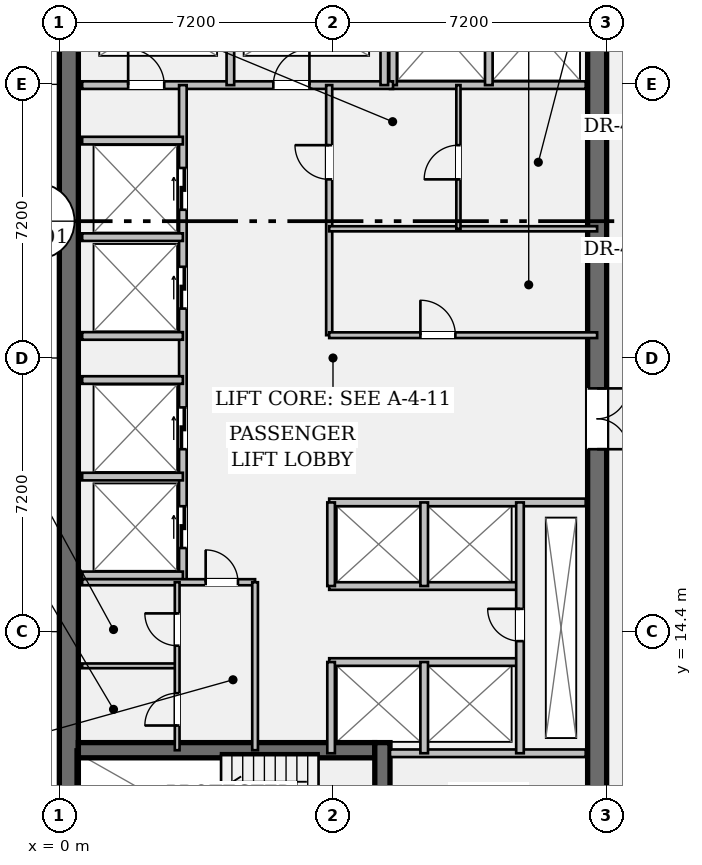
"""IFC4 building model, lengths in metres.
Left out: names, types, materials, properties, quantities, classifications, styles, units other than length and angle.
Written with IfcOpenShell. Run it as: python <this file> out.ifc"""

import sys

from ifc_helpers import new_model, si_unit, direction, frame, frame_2d, origin, place, context, subcontext, project, spatial, rectangle, extrude, element, fill, save


model = new_model("IFC4")
c1 = context("Model", 3, precision=1e-05, world=origin(), true_north=direction((0.0, 1.0)))
c2 = subcontext(c1, "Body", "Model", "MODEL_VIEW")
j1 = project(units=[si_unit("LENGTHUNIT", "METRE"), si_unit("PLANEANGLEUNIT", "RADIAN")], contexts=[c1])
p1 = place(None, origin())
s1 = spatial("IfcSite", under=j1, at=p1, CompositionType="ELEMENT")
p2 = place(p1, origin())
s2 = spatial("IfcBuilding", under=s1, at=p2, CompositionType="ELEMENT")
p3 = place(p2, frame((0.0, 0.0, 173.25)))
s3 = spatial("IfcBuildingStorey", under=s2, at=p3, CompositionType="ELEMENT", Elevation=173.25)
p4 = place(p3, frame((0.25, 7.2, 0.0), z_axis=(0.0, 0.0, 1.0), x_axis=(0.0, 1.0, 0.0)))
e1 = element("IfcWall", 1, at=p4, inside=s3, PredefinedType="SHEAR", context=c2, shape_type="SweptSolid", body=[
    extrude(rectangle(XDim=28.8, YDim=0.5, at=frame_2d((14.4, 0.0))), origin(), (0.0, 0.0, 1.0), 3.24),
])
p5 = place(p3, frame((14.15, 35.5, 0.0), z_axis=(0.0, 0.0, 1.0), x_axis=(0.0, -1.0, 0.0)))
e2 = element("IfcWall", 2, at=p5, inside=s3, PredefinedType="SHEAR", context=c2, shape_type="SweptSolid", body=[
    extrude(rectangle(XDim=27.8, YDim=0.5, at=frame_2d((13.9, 0.0))), origin(), (0.0, 0.0, 1.0), 3.24),
])
p6 = place(p5, frame((1.4, 0.0, 0.0)))
e3 = element("IfcOpeningElement", 3, at=p6, cuts=e2, PredefinedType="OPENING", context=c2, shape_type="SweptSolid", body=[
    extrude(rectangle(XDim=1.2, YDim=2.15, at=frame_2d((0.6, 1.075))), frame((0.0, 0.262, 0.0), z_axis=(0.0, -1.0, 0.0), x_axis=(1.0, 0.0, 0.0)), (0.0, 0.0, 1.0), 0.524),
])
p7 = place(p5, frame((25.35, 0.0, 0.0)))
e4 = element("IfcOpeningElement", 4, at=p7, cuts=e2, PredefinedType="OPENING", context=c2, shape_type="SweptSolid", body=[
    extrude(rectangle(XDim=1.2, YDim=2.15, at=frame_2d((0.6, 1.075))), frame((0.0, 0.262, 0.0), z_axis=(0.0, -1.0, 0.0), x_axis=(1.0, 0.0, 0.0)), (0.0, 0.0, 1.0), 0.524),
])
p8 = place(p5, frame((14.7, 0.0, 0.0)))
e5 = element("IfcOpeningElement", 5, at=p8, cuts=e2, PredefinedType="OPENING", context=c2, shape_type="SweptSolid", body=[
    extrude(rectangle(XDim=1.6, YDim=2.2, at=frame_2d((0.8, 1.1))), frame((0.0, 0.262, 0.0), z_axis=(0.0, -1.0, 0.0), x_axis=(1.0, 0.0, 0.0)), (0.0, 0.0, 1.0), 0.524),
])
p9 = place(p3, frame((0.5, 11.28, 0.0), z_axis=(0.0, 0.0, 1.0), x_axis=(1.0, 0.0, 0.0)))
e6 = element("IfcWall", 6, at=p9, inside=s3, PredefinedType="SHEAR", context=c2, shape_type="SweptSolid", body=[
    extrude(rectangle(XDim=7.8, YDim=0.4, at=frame_2d((3.9, 0.0))), origin(), (0.0, 0.0, 1.0), 3.24),
])
p10 = place(p3, frame((8.5, 7.7, 0.0), z_axis=(0.0, 0.0, 1.0), x_axis=(0.0, 1.0, 0.0)))
e7 = element("IfcWall", 7, at=p10, inside=s3, PredefinedType="SHEAR", context=c2, shape_type="SweptSolid", body=[
    extrude(rectangle(XDim=3.78, YDim=0.4, at=frame_2d((1.89, 0.0))), origin(), (0.0, 0.0, 1.0), 3.24),
])
p11 = place(p10, frame((0.85, 0.0, 0.0)))
e8 = element("IfcOpeningElement", 8, at=p11, cuts=e7, PredefinedType="OPENING", context=c2, shape_type="SweptSolid", body=[
    extrude(rectangle(XDim=1.1, YDim=2.15, at=frame_2d((0.55, 1.075))), frame((0.0, 0.212, 0.0), z_axis=(0.0, -1.0, 0.0), x_axis=(1.0, 0.0, 0.0)), (0.0, 0.0, 1.0), 0.424),
])
for number, where, z_axis, x_axis in (
    (9, (8.7, 11.2, 0.0), (0.0, 0.0, 1.0), (1.0, 0.0, 0.0)),
    (10, (8.7, 28.78, 0.0), (0.0, 0.0, 1.0), (1.0, 0.0, 0.0)),
):
    element("IfcWall", number, at=place(p3, frame(where, z_axis=z_axis, x_axis=x_axis)), inside=s3, PredefinedType="PARTITIONING", context=c2, shape_type="SweptSolid", body=[
        extrude(rectangle(XDim=5.15, YDim=0.2, at=frame_2d((2.575, 0.0))), origin(), (0.0, 0.0, 1.0), 3.24),
    ])
for number, where, z_axis, x_axis in (
    (11, (8.78, 28.78, 0.0), (0.0, 0.0, 1.0), (0.0, 1.0, 0.0)),
    (12, (11.3, 28.78, 0.0), (0.0, 0.0, 1.0), (0.0, 1.0, 0.0)),
):
    element("IfcWall", number, at=place(p3, frame(where, z_axis=z_axis, x_axis=x_axis)), inside=s3, PredefinedType="PARTITIONING", context=c2, shape_type="SweptSolid", body=[
        extrude(rectangle(XDim=3.1, YDim=0.2, at=frame_2d((1.55, 0.0))), origin(), (0.0, 0.0, 1.0), 3.24),
    ])
p12 = place(p3, frame((0.6, 28.78, 0.0), z_axis=(0.0, 0.0, 1.0), x_axis=(1.0, 0.0, 0.0)))
e13 = element("IfcWall", 13, at=p12, inside=s3, PredefinedType="PARTITIONING", context=c2, shape_type="SweptSolid", body=[
    extrude(rectangle(XDim=8.18, YDim=0.2, at=frame_2d((4.09, 0.0))), origin(), (0.0, 0.0, 1.0), 3.24),
])
p13 = place(p12, frame((1.21, 0.0, 0.0)))
e14 = element("IfcOpeningElement", 14, at=p13, cuts=e13, PredefinedType="OPENING", context=c2, shape_type="SweptSolid", body=[
    extrude(rectangle(XDim=0.95, YDim=2.15, at=frame_2d((0.475, 1.075))), frame((0.0, 0.112, 0.0), z_axis=(0.0, -1.0, 0.0), x_axis=(1.0, 0.0, 0.0)), (0.0, 0.0, 1.0), 0.224),
])
p14 = place(p12, frame((5.03, 0.0, 0.0)))
e15 = element("IfcOpeningElement", 15, at=p14, cuts=e13, PredefinedType="OPENING", context=c2, shape_type="SweptSolid", body=[
    extrude(rectangle(XDim=0.95, YDim=2.15, at=frame_2d((0.475, 1.075))), frame((0.0, 0.112, 0.0), z_axis=(0.0, -1.0, 0.0), x_axis=(1.0, 0.0, 0.0)), (0.0, 0.0, 1.0), 0.224),
])
for number, where, z_axis, x_axis in (
    (16, (4.5, 28.78, 0.0), (0.0, 0.0, 1.0), (0.0, 1.0, 0.0)),
    (17, (8.55, 28.78, 0.0), (0.0, 0.0, 1.0), (0.0, 1.0, 0.0)),
):
    element("IfcWall", number, at=place(p3, frame(where, z_axis=z_axis, x_axis=x_axis)), inside=s3, PredefinedType="PARTITIONING", context=c2, shape_type="SweptSolid", body=[
        extrude(rectangle(XDim=2.94, YDim=0.2, at=frame_2d((1.47, 0.0))), origin(), (0.0, 0.0, 1.0), 3.24),
    ])
p15 = place(p3, frame((3.25, 15.7, 0.0), z_axis=(0.0, 0.0, 1.0), x_axis=(0.0, 1.0, 0.0)))
e18 = element("IfcWall", 18, at=p15, inside=s3, PredefinedType="PARTITIONING", context=c2, shape_type="SweptSolid", body=[
    extrude(rectangle(XDim=13.08, YDim=0.2, at=frame_2d((6.54, 0.0))), origin(), (0.0, 0.0, 1.0), 3.24),
])
p16 = place(p15, frame((0.9, 0.0, 0.0)))
e19 = element("IfcOpeningElement", 19, at=p16, cuts=e18, PredefinedType="OPENING", context=c2, shape_type="SweptSolid", body=[
    extrude(rectangle(XDim=1.1, YDim=2.2, at=frame_2d((0.55, 1.1))), frame((0.0, 0.112, 0.0), z_axis=(0.0, -1.0, 0.0), x_axis=(1.0, 0.0, 0.0)), (0.0, 0.0, 1.0), 0.224),
])
p17 = place(p15, frame((3.5, 0.0, 0.0)))
e20 = element("IfcOpeningElement", 20, at=p17, cuts=e18, PredefinedType="OPENING", context=c2, shape_type="SweptSolid", body=[
    extrude(rectangle(XDim=1.1, YDim=2.2, at=frame_2d((0.55, 1.1))), frame((0.0, 0.112, 0.0), z_axis=(0.0, -1.0, 0.0), x_axis=(1.0, 0.0, 0.0)), (0.0, 0.0, 1.0), 0.224),
])
p18 = place(p15, frame((7.2, 0.0, 0.0)))
e21 = element("IfcOpeningElement", 21, at=p18, cuts=e18, PredefinedType="OPENING", context=c2, shape_type="SweptSolid", body=[
    extrude(rectangle(XDim=1.1, YDim=2.2, at=frame_2d((0.55, 1.1))), frame((0.0, 0.112, 0.0), z_axis=(0.0, -1.0, 0.0), x_axis=(1.0, 0.0, 0.0)), (0.0, 0.0, 1.0), 0.224),
])
p19 = place(p15, frame((9.8, 0.0, 0.0)))
e22 = element("IfcOpeningElement", 22, at=p19, cuts=e18, PredefinedType="OPENING", context=c2, shape_type="SweptSolid", body=[
    extrude(rectangle(XDim=1.1, YDim=2.2, at=frame_2d((0.55, 1.1))), frame((0.0, 0.112, 0.0), z_axis=(0.0, -1.0, 0.0), x_axis=(1.0, 0.0, 0.0)), (0.0, 0.0, 1.0), 0.224),
])
for number, where, z_axis, x_axis in (
    (23, (0.6, 15.88, 0.0), (0.0, 0.0, 1.0), (1.0, 0.0, 0.0)),
    (24, (0.6, 18.48, 0.0), (0.0, 0.0, 1.0), (1.0, 0.0, 0.0)),
    (25, (0.6, 22.18, 0.0), (0.0, 0.0, 1.0), (1.0, 0.0, 0.0)),
    (26, (0.6, 24.78, 0.0), (0.0, 0.0, 1.0), (1.0, 0.0, 0.0)),
    (27, (0.6, 21.02, 0.0), (0.0, 0.0, 1.0), (1.0, 0.0, 0.0)),
    (28, (0.6, 27.32, 0.0), (0.0, 0.0, 1.0), (1.0, 0.0, 0.0)),
):
    element("IfcWall", number, at=place(p3, frame(where, z_axis=z_axis, x_axis=x_axis)), inside=s3, PredefinedType="PARTITIONING", context=c2, shape_type="SweptSolid", body=[
        extrude(rectangle(XDim=2.65, YDim=0.2, at=frame_2d((1.325, 0.0))), origin(), (0.0, 0.0, 1.0), 3.24),
    ])
p20 = place(p3, frame((7.1, 22.2, 0.0), z_axis=(0.0, 0.0, 1.0), x_axis=(0.0, 1.0, 0.0)))
e29 = element("IfcWall", 29, at=p20, inside=s3, PredefinedType="PARTITIONING", context=c2, shape_type="SweptSolid", body=[
    extrude(rectangle(XDim=6.58, YDim=0.16, at=frame_2d((3.29, 0.0))), origin(), (0.0, 0.0, 1.0), 3.24),
])
p21 = place(p20, frame((4.1, 0.0, 0.0)))
e30 = element("IfcOpeningElement", 30, at=p21, cuts=e29, PredefinedType="OPENING", context=c2, shape_type="SweptSolid", body=[
    extrude(rectangle(XDim=0.9, YDim=2.15, at=frame_2d((0.45, 1.075))), frame((0.0, 0.092, 0.0), z_axis=(0.0, -1.0, 0.0), x_axis=(1.0, 0.0, 0.0)), (0.0, 0.0, 1.0), 0.184),
])
p22 = place(p3, frame((7.1, 22.2, 0.0), z_axis=(0.0, 0.0, 1.0), x_axis=(1.0, 0.0, 0.0)))
e31 = element("IfcWall", 31, at=p22, inside=s3, PredefinedType="PARTITIONING", context=c2, shape_type="SweptSolid", body=[
    extrude(rectangle(XDim=7.05, YDim=0.15, at=frame_2d((3.525, 0.0))), origin(), (0.0, 0.0, 1.0), 3.24),
])
p23 = place(p22, frame((2.4, 0.0, 0.0)))
e32 = element("IfcOpeningElement", 32, at=p23, cuts=e31, PredefinedType="OPENING", context=c2, shape_type="SweptSolid", body=[
    extrude(rectangle(XDim=0.92, YDim=2.15, at=frame_2d((0.46, 1.075))), frame((0.0, 0.087, 0.0), z_axis=(0.0, -1.0, 0.0), x_axis=(1.0, 0.0, 0.0)), (0.0, 0.0, 1.0), 0.174),
])
p24 = place(p3, frame((7.1, 25.0, 0.0), z_axis=(0.0, 0.0, 1.0), x_axis=(1.0, 0.0, 0.0)))
e33 = element("IfcWall", 33, at=p24, inside=s3, PredefinedType="PARTITIONING", context=c2, shape_type="SweptSolid", body=[
    extrude(rectangle(XDim=7.05, YDim=0.135, at=frame_2d((3.525, 0.0))), origin(), (0.0, 0.0, 1.0), 3.24),
])
p25 = place(p3, frame((10.5, 25.0, 0.0), z_axis=(0.0, 0.0, 1.0), x_axis=(0.0, 1.0, 0.0)))
e34 = element("IfcWall", 34, at=p25, inside=s3, PredefinedType="PARTITIONING", context=c2, shape_type="SweptSolid", body=[
    extrude(rectangle(XDim=3.78, YDim=0.11, at=frame_2d((1.89, 0.0))), origin(), (0.0, 0.0, 1.0), 3.24),
])
p26 = place(p25, frame((1.3, 0.0, 0.0)))
e35 = element("IfcOpeningElement", 35, at=p26, cuts=e34, PredefinedType="OPENING", context=c2, shape_type="SweptSolid", body=[
    extrude(rectangle(XDim=0.9, YDim=2.15, at=frame_2d((0.45, 1.075))), frame((0.0, 0.067, 0.0), z_axis=(0.0, -1.0, 0.0), x_axis=(1.0, 0.0, 0.0)), (0.0, 0.0, 1.0), 0.134),
])
p27 = place(p3, frame((7.1, 17.8, 0.0), z_axis=(0.0, 0.0, 1.0), x_axis=(1.0, 0.0, 0.0)))
e36 = element("IfcWall", 36, at=p27, inside=s3, PredefinedType="PARTITIONING", context=c2, shape_type="SweptSolid", body=[
    extrude(rectangle(XDim=6.75, YDim=0.2, at=frame_2d((3.375, 0.0))), origin(), (0.0, 0.0, 1.0), 3.24),
])
for number, where, z_axis, x_axis in (
    (37, (7.1, 15.6, 0.0), (0.0, 0.0, 1.0), (1.0, 0.0, 0.0)),
    (38, (7.1, 13.6, 0.0), (0.0, 0.0, 1.0), (1.0, 0.0, 0.0)),
):
    element("IfcWall", number, at=place(p3, frame(where, z_axis=z_axis, x_axis=x_axis)), inside=s3, PredefinedType="PARTITIONING", context=c2, shape_type="SweptSolid", body=[
        extrude(rectangle(XDim=5.02, YDim=0.2, at=frame_2d((2.51, 0.0))), origin(), (0.0, 0.0, 1.0), 3.24),
    ])
p28 = place(p3, frame((7.15, 15.6, 0.0), z_axis=(0.0, 0.0, 1.0), x_axis=(0.0, 1.0, 0.0)))
e39 = element("IfcWall", 39, at=p28, inside=s3, PredefinedType="PARTITIONING", context=c2, shape_type="SweptSolid", body=[
    extrude(rectangle(XDim=2.2, YDim=0.2, at=frame_2d((1.1, 0.0))), origin(), (0.0, 0.0, 1.0), 3.24),
])
p29 = place(p3, frame((7.15, 11.2, 0.0), z_axis=(0.0, 0.0, 1.0), x_axis=(0.0, 1.0, 0.0)))
e40 = element("IfcWall", 40, at=p29, inside=s3, PredefinedType="PARTITIONING", context=c2, shape_type="SweptSolid", body=[
    extrude(rectangle(XDim=2.4, YDim=0.2, at=frame_2d((1.2, 0.0))), origin(), (0.0, 0.0, 1.0), 3.24),
])
p30 = place(p3, frame((9.6, 15.6, 0.0), z_axis=(0.0, 0.0, 1.0), x_axis=(0.0, 1.0, 0.0)))
e41 = element("IfcWall", 41, at=p30, inside=s3, PredefinedType="PARTITIONING", context=c2, shape_type="SweptSolid", body=[
    extrude(rectangle(XDim=2.2, YDim=0.2, at=frame_2d((1.1, 0.0))), origin(), (0.0, 0.0, 1.0), 3.24),
])
p31 = place(p3, frame((9.6, 11.2, 0.0), z_axis=(0.0, 0.0, 1.0), x_axis=(0.0, 1.0, 0.0)))
e42 = element("IfcWall", 42, at=p31, inside=s3, PredefinedType="PARTITIONING", context=c2, shape_type="SweptSolid", body=[
    extrude(rectangle(XDim=2.4, YDim=0.2, at=frame_2d((1.2, 0.0))), origin(), (0.0, 0.0, 1.0), 3.24),
])
p32 = place(p3, frame((12.12, 11.2, 0.0), z_axis=(0.0, 0.0, 1.0), x_axis=(0.0, 1.0, 0.0)))
e43 = element("IfcWall", 43, at=p32, inside=s3, PredefinedType="PARTITIONING", context=c2, shape_type="SweptSolid", body=[
    extrude(rectangle(XDim=6.6, YDim=0.2, at=frame_2d((3.3, 0.0))), origin(), (0.0, 0.0, 1.0), 3.24),
])
p33 = place(p32, frame((2.95, 0.0, 0.0)))
e44 = element("IfcOpeningElement", 44, at=p33, cuts=e43, PredefinedType="OPENING", context=c2, shape_type="SweptSolid", body=[
    extrude(rectangle(XDim=0.85, YDim=2.15, at=frame_2d((0.425, 1.075))), frame((0.0, 0.112, 0.0), z_axis=(0.0, -1.0, 0.0), x_axis=(1.0, 0.0, 0.0)), (0.0, 0.0, 1.0), 0.224),
])
p34 = place(p3, frame((0.6, 15.7, 0.0), z_axis=(0.0, 0.0, 1.0), x_axis=(1.0, 0.0, 0.0)))
e45 = element("IfcWall", 45, at=p34, inside=s3, PredefinedType="PARTITIONING", context=c2, shape_type="SweptSolid", body=[
    extrude(rectangle(XDim=4.55, YDim=0.16, at=frame_2d((2.275, 0.0))), origin(), (0.0, 0.0, 1.0), 3.24),
])
p35 = place(p34, frame((3.25, 0.0, 0.0)))
e46 = element("IfcOpeningElement", 46, at=p35, cuts=e45, PredefinedType="OPENING", context=c2, shape_type="SweptSolid", body=[
    extrude(rectangle(XDim=0.85, YDim=2.15, at=frame_2d((0.425, 1.075))), frame((0.0, 0.092, 0.0), z_axis=(0.0, -1.0, 0.0), x_axis=(1.0, 0.0, 0.0)), (0.0, 0.0, 1.0), 0.184),
])
p36 = place(p3, frame((5.15, 11.28, 0.0), z_axis=(0.0, 0.0, 1.0), x_axis=(0.0, 1.0, 0.0)))
e47 = element("IfcWall", 47, at=p36, inside=s3, PredefinedType="PARTITIONING", context=c2, shape_type="SweptSolid", body=[
    extrude(rectangle(XDim=4.42, YDim=0.15, at=frame_2d((2.21, 0.0))), origin(), (0.0, 0.0, 1.0), 3.24),
])
p37 = place(p3, frame((0.6, 13.5, 0.0), z_axis=(0.0, 0.0, 1.0), x_axis=(1.0, 0.0, 0.0)))
e48 = element("IfcWall", 48, at=p37, inside=s3, PredefinedType="PARTITIONING", context=c2, shape_type="SweptSolid", body=[
    extrude(rectangle(XDim=2.5, YDim=0.125, at=frame_2d((1.25, 0.0))), origin(), (0.0, 0.0, 1.0), 3.24),
])
p38 = place(p3, frame((3.1, 11.28, 0.0), z_axis=(0.0, 0.0, 1.0), x_axis=(0.0, 1.0, 0.0)))
e49 = element("IfcWall", 49, at=p38, inside=s3, PredefinedType="PARTITIONING", context=c2, shape_type="SweptSolid", body=[
    extrude(rectangle(XDim=4.42, YDim=0.125, at=frame_2d((2.21, 0.0))), origin(), (0.0, 0.0, 1.0), 3.24),
])
p39 = place(p38, frame((0.65, 0.0, 0.0)))
e50 = element("IfcOpeningElement", 50, at=p39, cuts=e49, PredefinedType="OPENING", context=c2, shape_type="SweptSolid", body=[
    extrude(rectangle(XDim=0.85, YDim=2.15, at=frame_2d((0.425, 1.075))), frame((0.0, 0.074, 0.0), z_axis=(0.0, -1.0, 0.0), x_axis=(1.0, 0.0, 0.0)), (0.0, 0.0, 1.0), 0.149),
])
p40 = place(p38, frame((2.75, 0.0, 0.0)))
e51 = element("IfcOpeningElement", 51, at=p40, cuts=e49, PredefinedType="OPENING", context=c2, shape_type="SweptSolid", body=[
    extrude(rectangle(XDim=0.85, YDim=2.15, at=frame_2d((0.425, 1.075))), frame((0.0, 0.074, 0.0), z_axis=(0.0, -1.0, 0.0), x_axis=(1.0, 0.0, 0.0)), (0.0, 0.0, 1.0), 0.149),
])
p41 = place(p13, origin())
e52 = element("IfcDoor", 52, at=p41, inside=s3, OperationType="SINGLE_SWING_LEFT", PredefinedType="DOOR", context=c2, shape_type="SweptSolid", body=[
    extrude(rectangle(XDim=0.95, YDim=2.15, at=frame_2d((0.475, 1.075))), frame((0.0, 0.025, 0.0), z_axis=(0.0, -1.0, 0.0), x_axis=(1.0, 0.0, 0.0)), (0.0, 0.0, 1.0), 0.05),
])
fill(e14, e52)
p42 = place(p14, origin())
e53 = element("IfcDoor", 53, at=p42, inside=s3, OperationType="SINGLE_SWING_RIGHT", PredefinedType="DOOR", context=c2, shape_type="SweptSolid", body=[
    extrude(rectangle(XDim=0.95, YDim=2.15, at=frame_2d((0.475, 1.075))), frame((0.0, 0.025, 0.0), z_axis=(0.0, -1.0, 0.0), x_axis=(1.0, 0.0, 0.0)), (0.0, 0.0, 1.0), 0.05),
])
fill(e15, e53)
p43 = place(p8, origin())
e54 = element("IfcDoor", 54, at=p43, inside=s3, OperationType="DOUBLE_DOOR_SINGLE_SWING", PredefinedType="DOOR", context=c2, shape_type="SweptSolid", body=[
    extrude(rectangle(XDim=1.6, YDim=2.2, at=frame_2d((0.8, 1.1))), frame((0.0, 0.025, 0.0), z_axis=(0.0, -1.0, 0.0), x_axis=(1.0, 0.0, 0.0)), (0.0, 0.0, 1.0), 0.05),
])
fill(e5, e54)
p44 = place(p16, origin())
e55 = element("IfcDoor", 55, at=p44, inside=s3, OperationType="DOUBLE_DOOR_SLIDING", PredefinedType="DOOR", context=c2, shape_type="SweptSolid", body=[
    extrude(rectangle(XDim=1.1, YDim=2.2, at=frame_2d((0.55, 1.1))), frame((0.0, 0.025, 0.0), z_axis=(0.0, -1.0, 0.0), x_axis=(1.0, 0.0, 0.0)), (0.0, 0.0, 1.0), 0.05),
])
fill(e19, e55)
p45 = place(p17, origin())
e56 = element("IfcDoor", 56, at=p45, inside=s3, OperationType="DOUBLE_DOOR_SLIDING", PredefinedType="DOOR", context=c2, shape_type="SweptSolid", body=[
    extrude(rectangle(XDim=1.1, YDim=2.2, at=frame_2d((0.55, 1.1))), frame((0.0, 0.025, 0.0), z_axis=(0.0, -1.0, 0.0), x_axis=(1.0, 0.0, 0.0)), (0.0, 0.0, 1.0), 0.05),
])
fill(e20, e56)
p46 = place(p18, origin())
e57 = element("IfcDoor", 57, at=p46, inside=s3, OperationType="DOUBLE_DOOR_SLIDING", PredefinedType="DOOR", context=c2, shape_type="SweptSolid", body=[
    extrude(rectangle(XDim=1.1, YDim=2.2, at=frame_2d((0.55, 1.1))), frame((0.0, 0.025, 0.0), z_axis=(0.0, -1.0, 0.0), x_axis=(1.0, 0.0, 0.0)), (0.0, 0.0, 1.0), 0.05),
])
fill(e21, e57)
p47 = place(p19, origin())
e58 = element("IfcDoor", 58, at=p47, inside=s3, OperationType="DOUBLE_DOOR_SLIDING", PredefinedType="DOOR", context=c2, shape_type="SweptSolid", body=[
    extrude(rectangle(XDim=1.1, YDim=2.2, at=frame_2d((0.55, 1.1))), frame((0.0, 0.025, 0.0), z_axis=(0.0, -1.0, 0.0), x_axis=(1.0, 0.0, 0.0)), (0.0, 0.0, 1.0), 0.05),
])
fill(e22, e58)
p48 = place(p23, origin())
e59 = element("IfcDoor", 59, at=p48, inside=s3, OperationType="SINGLE_SWING_LEFT", PredefinedType="DOOR", context=c2, shape_type="SweptSolid", body=[
    extrude(rectangle(XDim=0.92, YDim=2.15, at=frame_2d((0.46, 1.075))), frame((0.0, 0.025, 0.0), z_axis=(0.0, -1.0, 0.0), x_axis=(1.0, 0.0, 0.0)), (0.0, 0.0, 1.0), 0.05),
])
fill(e32, e59)
p49 = place(p21, origin())
e60 = element("IfcDoor", 60, at=p49, inside=s3, OperationType="SINGLE_SWING_RIGHT", PredefinedType="DOOR", context=c2, shape_type="SweptSolid", body=[
    extrude(rectangle(XDim=0.9, YDim=2.15, at=frame_2d((0.45, 1.075))), frame((0.0, 0.025, 0.0), z_axis=(0.0, -1.0, 0.0), x_axis=(1.0, 0.0, 0.0)), (0.0, 0.0, 1.0), 0.05),
])
fill(e30, e60)
p50 = place(p26, origin())
e61 = element("IfcDoor", 61, at=p50, inside=s3, OperationType="SINGLE_SWING_LEFT", PredefinedType="DOOR", context=c2, shape_type="SweptSolid", body=[
    extrude(rectangle(XDim=0.9, YDim=2.15, at=frame_2d((0.45, 1.075))), frame((0.0, 0.025, 0.0), z_axis=(0.0, -1.0, 0.0), x_axis=(1.0, 0.0, 0.0)), (0.0, 0.0, 1.0), 0.05),
])
fill(e35, e61)
p51 = place(p33, origin())
e62 = element("IfcDoor", 62, at=p51, inside=s3, OperationType="SINGLE_SWING_RIGHT", PredefinedType="DOOR", context=c2, shape_type="SweptSolid", body=[
    extrude(rectangle(XDim=0.85, YDim=2.15, at=frame_2d((0.425, 1.075))), frame((0.0, 0.025, 0.0), z_axis=(0.0, -1.0, 0.0), x_axis=(1.0, 0.0, 0.0)), (0.0, 0.0, 1.0), 0.05),
])
fill(e44, e62)
p52 = place(p35, origin())
e63 = element("IfcDoor", 63, at=p52, inside=s3, OperationType="SINGLE_SWING_LEFT", PredefinedType="DOOR", context=c2, shape_type="SweptSolid", body=[
    extrude(rectangle(XDim=0.85, YDim=2.15, at=frame_2d((0.425, 1.075))), frame((0.0, 0.025, 0.0), z_axis=(0.0, -1.0, 0.0), x_axis=(1.0, 0.0, 0.0)), (0.0, 0.0, 1.0), 0.05),
])
fill(e46, e63)
p53 = place(p39, origin())
e64 = element("IfcDoor", 64, at=p53, inside=s3, OperationType="SINGLE_SWING_LEFT", PredefinedType="DOOR", context=c2, shape_type="SweptSolid", body=[
    extrude(rectangle(XDim=0.85, YDim=2.15, at=frame_2d((0.425, 1.075))), frame((0.0, 0.025, 0.0), z_axis=(0.0, -1.0, 0.0), x_axis=(1.0, 0.0, 0.0)), (0.0, 0.0, 1.0), 0.05),
])
fill(e50, e64)
p54 = place(p40, origin())
e65 = element("IfcDoor", 65, at=p54, inside=s3, OperationType="SINGLE_SWING_RIGHT", PredefinedType="DOOR", context=c2, shape_type="SweptSolid", body=[
    extrude(rectangle(XDim=0.85, YDim=2.15, at=frame_2d((0.425, 1.075))), frame((0.0, 0.025, 0.0), z_axis=(0.0, -1.0, 0.0), x_axis=(1.0, 0.0, 0.0)), (0.0, 0.0, 1.0), 0.05),
])
fill(e51, e65)
save(model, sys.argv[1])
